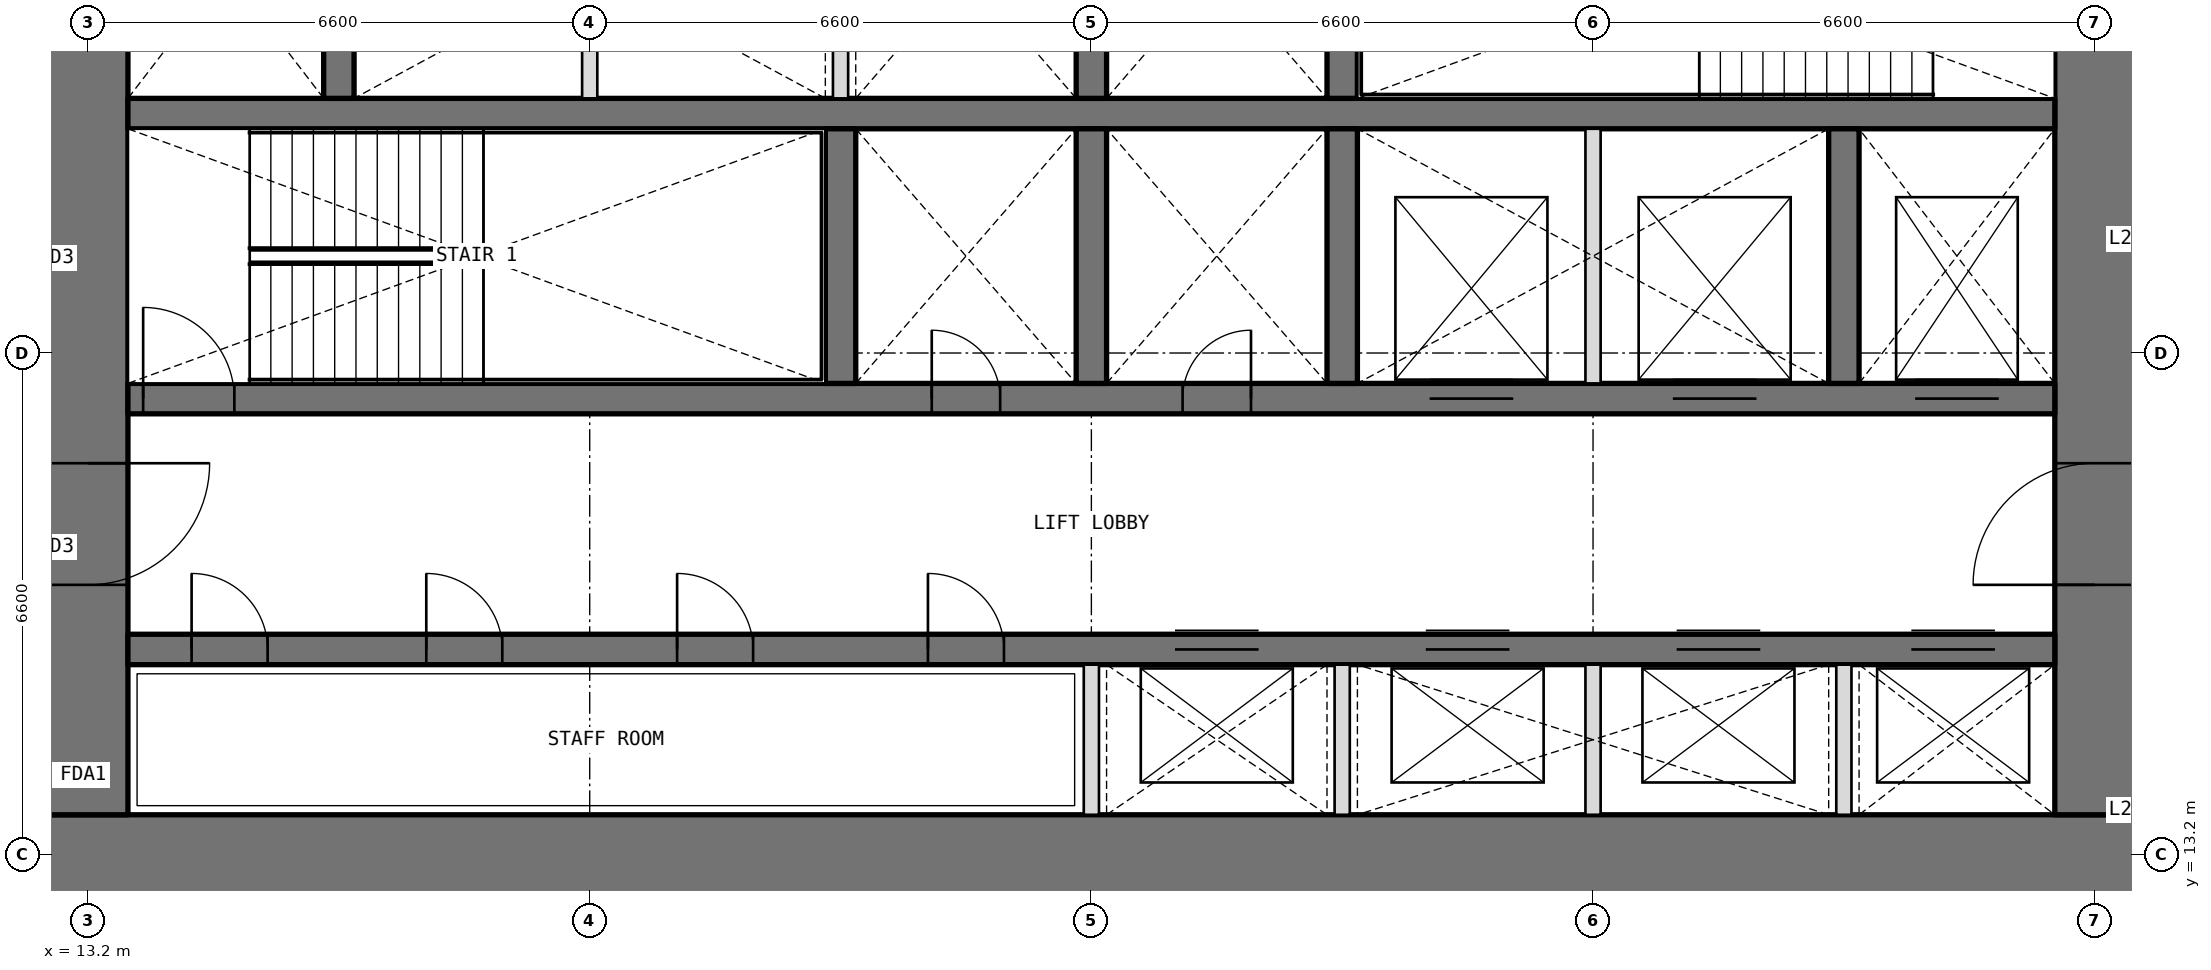
"""IFC4 building model, lengths in metres.
Left out: names, types, materials, properties, quantities, classifications, styles, units other than length and angle.
Written with IfcOpenShell. Run it as: python <this file> out.ifc"""

import sys

from ifc_helpers import new_model, si_unit, direction, frame, frame_2d, origin, place, context, subcontext, project, spatial, rectangle, extrude, element, fill, save


model = new_model("IFC4")
c1 = context("Model", 3, precision=1e-05, world=origin(), true_north=direction((0.0, 1.0)))
c2 = subcontext(c1, "Body", "Model", "MODEL_VIEW")
j1 = project(units=[si_unit("LENGTHUNIT", "METRE"), si_unit("PLANEANGLEUNIT", "RADIAN")], contexts=[c1])
p1 = place(None, origin())
s1 = spatial("IfcSite", under=j1, at=p1, CompositionType="ELEMENT")
p2 = place(p1, origin())
s2 = spatial("IfcBuilding", under=s1, at=p2, CompositionType="ELEMENT")
p3 = place(p2, frame((0.0, 0.0, 124.2)))
s3 = spatial("IfcBuildingStorey", under=s2, at=p3, CompositionType="ELEMENT", Elevation=124.2)
p4 = place(p3, frame((12.675, 13.2, 0.0), z_axis=(0.0, 0.0, 1.0), x_axis=(1.0, 0.0, 0.0)))
e1 = element("IfcWall", 1, at=p4, inside=s3, PredefinedType="SHEAR", context=c2, shape_type="SweptSolid", body=[
    extrude(rectangle(XDim=27.45, YDim=1.05, at=frame_2d((13.725, 0.0))), origin(), (0.0, 0.0, 1.0), 4.2),
])
p5 = place(p3, frame((39.6, 13.725, 0.0), z_axis=(0.0, 0.0, 1.0), x_axis=(0.0, 1.0, 0.0)))
e2 = element("IfcWall", 2, at=p5, inside=s3, PredefinedType="SHEAR", context=c2, shape_type="SweptSolid", body=[
    extrude(rectangle(XDim=18.75, YDim=1.05, at=frame_2d((9.375, 0.0))), origin(), (0.0, 0.0, 1.0), 4.2),
])
p6 = place(p5, frame((3.025, 0.0, 0.0)))
e3 = element("IfcOpeningElement", 3, at=p6, cuts=e2, PredefinedType="OPENING", context=c2, shape_type="SweptSolid", body=[
    extrude(rectangle(XDim=1.6, YDim=2.1, at=frame_2d((0.8, 1.05))), frame((0.0, 0.535, 0.0), z_axis=(0.0, -1.0, 0.0), x_axis=(1.0, 0.0, 0.0)), (0.0, 0.0, 1.0), 1.07),
])
p7 = place(p5, frame((13.825, 0.0, 0.0)))
e4 = element("IfcOpeningElement", 4, at=p7, cuts=e2, PredefinedType="OPENING", context=c2, shape_type="SweptSolid", body=[
    extrude(rectangle(XDim=1.6, YDim=2.1, at=frame_2d((0.8, 1.05))), frame((0.0, 0.535, 0.0), z_axis=(0.0, -1.0, 0.0), x_axis=(1.0, 0.0, 0.0)), (0.0, 0.0, 1.0), 1.07),
])
p8 = place(p3, frame((13.2, 32.475, 0.0), z_axis=(0.0, 0.0, 1.0), x_axis=(0.0, -1.0, 0.0)))
e5 = element("IfcWall", 5, at=p8, inside=s3, PredefinedType="SHEAR", context=c2, shape_type="SweptSolid", body=[
    extrude(rectangle(XDim=18.75, YDim=1.05, at=frame_2d((9.375, 0.0))), origin(), (0.0, 0.0, 1.0), 4.2),
])
p9 = place(p8, frame((14.125, 0.0, 0.0)))
e6 = element("IfcOpeningElement", 6, at=p9, cuts=e5, PredefinedType="OPENING", context=c2, shape_type="SweptSolid", body=[
    extrude(rectangle(XDim=1.6, YDim=2.1, at=frame_2d((0.8, 1.05))), frame((0.0, 0.535, 0.0), z_axis=(0.0, -1.0, 0.0), x_axis=(1.0, 0.0, 0.0)), (0.0, 0.0, 1.0), 1.07),
])
p10 = place(p8, frame((3.325, 0.0, 0.0)))
e7 = element("IfcOpeningElement", 7, at=p10, cuts=e5, PredefinedType="OPENING", context=c2, shape_type="SweptSolid", body=[
    extrude(rectangle(XDim=1.6, YDim=2.1, at=frame_2d((0.8, 1.05))), frame((0.0, 0.535, 0.0), z_axis=(0.0, -1.0, 0.0), x_axis=(1.0, 0.0, 0.0)), (0.0, 0.0, 1.0), 1.07),
])
p11 = place(p3, frame((13.725, 15.9, 0.0), z_axis=(0.0, 0.0, 1.0), x_axis=(1.0, 0.0, 0.0)))
e8 = element("IfcWall", 8, at=p11, inside=s3, PredefinedType="SHEAR", context=c2, shape_type="SweptSolid", body=[
    extrude(rectangle(XDim=25.35, YDim=0.4, at=frame_2d((12.675, 0.0))), origin(), (0.0, 0.0, 1.0), 4.2),
])
p12 = place(p11, frame((0.837, 0.0, 0.0)))
e9 = element("IfcOpeningElement", 9, at=p12, cuts=e8, PredefinedType="OPENING", context=c2, shape_type="SweptSolid", body=[
    extrude(rectangle(XDim=1.0, YDim=2.1, at=frame_2d((0.5, 1.05))), frame((0.0, 0.21, 0.0), z_axis=(0.0, -1.0, 0.0), x_axis=(1.0, 0.0, 0.0)), (0.0, 0.0, 1.0), 0.42),
])
p13 = place(p11, frame((3.925, 0.0, 0.0)))
e10 = element("IfcOpeningElement", 10, at=p13, cuts=e8, PredefinedType="OPENING", context=c2, shape_type="SweptSolid", body=[
    extrude(rectangle(XDim=1.0, YDim=2.1, at=frame_2d((0.5, 1.05))), frame((0.0, 0.21, 0.0), z_axis=(0.0, -1.0, 0.0), x_axis=(1.0, 0.0, 0.0)), (0.0, 0.0, 1.0), 0.42),
])
p14 = place(p11, frame((7.225, 0.0, 0.0)))
e11 = element("IfcOpeningElement", 11, at=p14, cuts=e8, PredefinedType="OPENING", context=c2, shape_type="SweptSolid", body=[
    extrude(rectangle(XDim=1.0, YDim=2.1, at=frame_2d((0.5, 1.05))), frame((0.0, 0.21, 0.0), z_axis=(0.0, -1.0, 0.0), x_axis=(1.0, 0.0, 0.0)), (0.0, 0.0, 1.0), 0.42),
])
p15 = place(p11, frame((10.525, 0.0, 0.0)))
e12 = element("IfcOpeningElement", 12, at=p15, cuts=e8, PredefinedType="OPENING", context=c2, shape_type="SweptSolid", body=[
    extrude(rectangle(XDim=1.0, YDim=2.1, at=frame_2d((0.5, 1.05))), frame((0.0, 0.21, 0.0), z_axis=(0.0, -1.0, 0.0), x_axis=(1.0, 0.0, 0.0)), (0.0, 0.0, 1.0), 0.42),
])
p16 = place(p11, frame((13.775, 0.0, 0.0)))
e13 = element("IfcOpeningElement", 13, at=p16, cuts=e8, PredefinedType="OPENING", context=c2, shape_type="SweptSolid", body=[
    extrude(rectangle(XDim=1.1, YDim=2.1, at=frame_2d((0.55, 1.05))), frame((0.0, 0.21, 0.0), z_axis=(0.0, -1.0, 0.0), x_axis=(1.0, 0.0, 0.0)), (0.0, 0.0, 1.0), 0.42),
])
p17 = place(p11, frame((17.075, 0.0, 0.0)))
e14 = element("IfcOpeningElement", 14, at=p17, cuts=e8, PredefinedType="OPENING", context=c2, shape_type="SweptSolid", body=[
    extrude(rectangle(XDim=1.1, YDim=2.1, at=frame_2d((0.55, 1.05))), frame((0.0, 0.21, 0.0), z_axis=(0.0, -1.0, 0.0), x_axis=(1.0, 0.0, 0.0)), (0.0, 0.0, 1.0), 0.42),
])
p18 = place(p11, frame((20.375, 0.0, 0.0)))
e15 = element("IfcOpeningElement", 15, at=p18, cuts=e8, PredefinedType="OPENING", context=c2, shape_type="SweptSolid", body=[
    extrude(rectangle(XDim=1.1, YDim=2.1, at=frame_2d((0.55, 1.05))), frame((0.0, 0.21, 0.0), z_axis=(0.0, -1.0, 0.0), x_axis=(1.0, 0.0, 0.0)), (0.0, 0.0, 1.0), 0.42),
])
p19 = place(p11, frame((23.462, 0.0, 0.0)))
e16 = element("IfcOpeningElement", 16, at=p19, cuts=e8, PredefinedType="OPENING", context=c2, shape_type="SweptSolid", body=[
    extrude(rectangle(XDim=1.1, YDim=2.1, at=frame_2d((0.55, 1.05))), frame((0.0, 0.21, 0.0), z_axis=(0.0, -1.0, 0.0), x_axis=(1.0, 0.0, 0.0)), (0.0, 0.0, 1.0), 0.42),
])
p20 = place(p3, frame((13.725, 19.2, 0.0), z_axis=(0.0, 0.0, 1.0), x_axis=(1.0, 0.0, 0.0)))
e17 = element("IfcWall", 17, at=p20, inside=s3, PredefinedType="SHEAR", context=c2, shape_type="SweptSolid", body=[
    extrude(rectangle(XDim=25.35, YDim=0.4, at=frame_2d((12.675, 0.0))), origin(), (0.0, 0.0, 1.0), 4.2),
])
p21 = place(p20, frame((10.575, 0.0, 0.0)))
e18 = element("IfcOpeningElement", 18, at=p21, cuts=e17, PredefinedType="OPENING", context=c2, shape_type="SweptSolid", body=[
    extrude(rectangle(XDim=0.9, YDim=2.1, at=frame_2d((0.45, 1.05))), frame((0.0, 0.21, 0.0), z_axis=(0.0, -1.0, 0.0), x_axis=(1.0, 0.0, 0.0)), (0.0, 0.0, 1.0), 0.42),
])
p22 = place(p20, frame((13.875, 0.0, 0.0)))
e19 = element("IfcOpeningElement", 19, at=p22, cuts=e17, PredefinedType="OPENING", context=c2, shape_type="SweptSolid", body=[
    extrude(rectangle(XDim=0.9, YDim=2.1, at=frame_2d((0.45, 1.05))), frame((0.0, 0.21, 0.0), z_axis=(0.0, -1.0, 0.0), x_axis=(1.0, 0.0, 0.0)), (0.0, 0.0, 1.0), 0.42),
])
p23 = place(p20, frame((0.2, 0.0, 0.0)))
e20 = element("IfcOpeningElement", 20, at=p23, cuts=e17, PredefinedType="OPENING", context=c2, shape_type="SweptSolid", body=[
    extrude(rectangle(XDim=1.2, YDim=2.1, at=frame_2d((0.6, 1.05))), frame((0.0, 0.21, 0.0), z_axis=(0.0, -1.0, 0.0), x_axis=(1.0, 0.0, 0.0)), (0.0, 0.0, 1.0), 0.42),
])
p24 = place(p20, frame((23.512, 0.0, 0.0)))
e21 = element("IfcOpeningElement", 21, at=p24, cuts=e17, PredefinedType="OPENING", context=c2, shape_type="SweptSolid", body=[
    extrude(rectangle(XDim=1.1, YDim=2.1, at=frame_2d((0.55, 1.05))), frame((0.0, 0.21, 0.0), z_axis=(0.0, -1.0, 0.0), x_axis=(1.0, 0.0, 0.0)), (0.0, 0.0, 1.0), 0.42),
])
p25 = place(p20, frame((17.125, 0.0, 0.0)))
e22 = element("IfcOpeningElement", 22, at=p25, cuts=e17, PredefinedType="OPENING", context=c2, shape_type="SweptSolid", body=[
    extrude(rectangle(XDim=1.1, YDim=2.1, at=frame_2d((0.55, 1.05))), frame((0.0, 0.21, 0.0), z_axis=(0.0, -1.0, 0.0), x_axis=(1.0, 0.0, 0.0)), (0.0, 0.0, 1.0), 0.42),
])
p26 = place(p20, frame((20.325, 0.0, 0.0)))
e23 = element("IfcOpeningElement", 23, at=p26, cuts=e17, PredefinedType="OPENING", context=c2, shape_type="SweptSolid", body=[
    extrude(rectangle(XDim=1.1, YDim=2.1, at=frame_2d((0.55, 1.05))), frame((0.0, 0.21, 0.0), z_axis=(0.0, -1.0, 0.0), x_axis=(1.0, 0.0, 0.0)), (0.0, 0.0, 1.0), 0.42),
])
p27 = place(p3, frame((13.725, 22.95, 0.0), z_axis=(0.0, 0.0, 1.0), x_axis=(1.0, 0.0, 0.0)))
e24 = element("IfcWall", 24, at=p27, inside=s3, PredefinedType="SHEAR", context=c2, shape_type="SweptSolid", body=[
    extrude(rectangle(XDim=25.35, YDim=0.4, at=frame_2d((12.675, 0.0))), origin(), (0.0, 0.0, 1.0), 4.2),
])
for number, where, z_axis, x_axis in (
    (25, (23.1, 19.4, 0.0), (0.0, 0.0, 1.0), (0.0, 1.0, 0.0)),
    (26, (26.4, 19.4, 0.0), (0.0, 0.0, 1.0), (0.0, 1.0, 0.0)),
    (27, (29.7, 19.4, 0.0), (0.0, 0.0, 1.0), (0.0, 1.0, 0.0)),
    (28, (36.3, 19.4, 0.0), (0.0, 0.0, 1.0), (0.0, 1.0, 0.0)),
    (29, (16.5, 23.15, 0.0), (0.0, 0.0, 1.0), (0.0, 1.0, 0.0)),
    (30, (26.4, 23.15, 0.0), (0.0, 0.0, 1.0), (0.0, 1.0, 0.0)),
    (31, (29.7, 23.15, 0.0), (0.0, 0.0, 1.0), (0.0, 1.0, 0.0)),
):
    element("IfcWall", number, at=place(p3, frame(where, z_axis=z_axis, x_axis=x_axis)), inside=s3, PredefinedType="SHEAR", context=c2, shape_type="SweptSolid", body=[
        extrude(rectangle(XDim=3.35, YDim=0.4, at=frame_2d((1.675, 0.0))), origin(), (0.0, 0.0, 1.0), 4.2),
    ])
for number, where, z_axis, x_axis in (
    (32, (26.4, 13.725, 0.0), (0.0, 0.0, 1.0), (0.0, 1.0, 0.0)),
    (33, (29.7, 13.725, 0.0), (0.0, 0.0, 1.0), (0.0, 1.0, 0.0)),
    (34, (33.0, 13.725, 0.0), (0.0, 0.0, 1.0), (0.0, 1.0, 0.0)),
    (35, (36.3, 13.725, 0.0), (0.0, 0.0, 1.0), (0.0, 1.0, 0.0)),
):
    element("IfcWall", number, at=place(p3, frame(where, z_axis=z_axis, x_axis=x_axis)), inside=s3, PredefinedType="PARTITIONING", context=c2, shape_type="SweptSolid", body=[
        extrude(rectangle(XDim=1.975, YDim=0.2, at=frame_2d((0.987, 0.0))), origin(), (0.0, 0.0, 1.0), 4.2),
    ])
for number, where, z_axis, x_axis in (
    (36, (33.0, 19.4, 0.0), (0.0, 0.0, 1.0), (0.0, 1.0, 0.0)),
    (37, (19.8, 23.15, 0.0), (0.0, 0.0, 1.0), (0.0, 1.0, 0.0)),
    (38, (23.1, 23.15, 0.0), (0.0, 0.0, 1.0), (0.0, 1.0, 0.0)),
):
    element("IfcWall", number, at=place(p3, frame(where, z_axis=z_axis, x_axis=x_axis)), inside=s3, PredefinedType="PARTITIONING", context=c2, shape_type="SweptSolid", body=[
        extrude(rectangle(XDim=3.35, YDim=0.2, at=frame_2d((1.675, 0.0))), origin(), (0.0, 0.0, 1.0), 4.2),
    ])
p28 = place(p21, origin())
e39 = element("IfcDoor", 39, at=p28, inside=s3, OperationType="SINGLE_SWING_LEFT", PredefinedType="DOOR", context=c2, shape_type="SweptSolid", body=[
    extrude(rectangle(XDim=0.9, YDim=2.1, at=frame_2d((0.45, 1.05))), frame((0.0, 0.025, 0.0), z_axis=(0.0, -1.0, 0.0), x_axis=(1.0, 0.0, 0.0)), (0.0, 0.0, 1.0), 0.05),
])
fill(e18, e39)
p29 = place(p22, origin())
e40 = element("IfcDoor", 40, at=p29, inside=s3, OperationType="SINGLE_SWING_RIGHT", PredefinedType="DOOR", context=c2, shape_type="SweptSolid", body=[
    extrude(rectangle(XDim=0.9, YDim=2.1, at=frame_2d((0.45, 1.05))), frame((0.0, 0.025, 0.0), z_axis=(0.0, -1.0, 0.0), x_axis=(1.0, 0.0, 0.0)), (0.0, 0.0, 1.0), 0.05),
])
fill(e19, e40)
p30 = place(p12, origin())
e41 = element("IfcDoor", 41, at=p30, inside=s3, OperationType="SINGLE_SWING_LEFT", PredefinedType="DOOR", context=c2, shape_type="SweptSolid", body=[
    extrude(rectangle(XDim=1.0, YDim=2.1, at=frame_2d((0.5, 1.05))), frame((0.0, 0.025, 0.0), z_axis=(0.0, -1.0, 0.0), x_axis=(1.0, 0.0, 0.0)), (0.0, 0.0, 1.0), 0.05),
])
fill(e9, e41)
p31 = place(p13, origin())
e42 = element("IfcDoor", 42, at=p31, inside=s3, OperationType="SINGLE_SWING_LEFT", PredefinedType="DOOR", context=c2, shape_type="SweptSolid", body=[
    extrude(rectangle(XDim=1.0, YDim=2.1, at=frame_2d((0.5, 1.05))), frame((0.0, 0.025, 0.0), z_axis=(0.0, -1.0, 0.0), x_axis=(1.0, 0.0, 0.0)), (0.0, 0.0, 1.0), 0.05),
])
fill(e10, e42)
p32 = place(p14, origin())
e43 = element("IfcDoor", 43, at=p32, inside=s3, OperationType="SINGLE_SWING_LEFT", PredefinedType="DOOR", context=c2, shape_type="SweptSolid", body=[
    extrude(rectangle(XDim=1.0, YDim=2.1, at=frame_2d((0.5, 1.05))), frame((0.0, 0.025, 0.0), z_axis=(0.0, -1.0, 0.0), x_axis=(1.0, 0.0, 0.0)), (0.0, 0.0, 1.0), 0.05),
])
fill(e11, e43)
p33 = place(p15, origin())
e44 = element("IfcDoor", 44, at=p33, inside=s3, OperationType="SINGLE_SWING_LEFT", PredefinedType="DOOR", context=c2, shape_type="SweptSolid", body=[
    extrude(rectangle(XDim=1.0, YDim=2.1, at=frame_2d((0.5, 1.05))), frame((0.0, 0.025, 0.0), z_axis=(0.0, -1.0, 0.0), x_axis=(1.0, 0.0, 0.0)), (0.0, 0.0, 1.0), 0.05),
])
fill(e12, e44)
p34 = place(p23, origin())
e45 = element("IfcDoor", 45, at=p34, inside=s3, OperationType="SINGLE_SWING_LEFT", PredefinedType="DOOR", context=c2, shape_type="SweptSolid", body=[
    extrude(rectangle(XDim=1.2, YDim=2.1, at=frame_2d((0.6, 1.05))), frame((0.0, 0.025, 0.0), z_axis=(0.0, -1.0, 0.0), x_axis=(1.0, 0.0, 0.0)), (0.0, 0.0, 1.0), 0.05),
])
fill(e20, e45)
p35 = place(p9, origin())
e46 = element("IfcDoor", 46, at=p35, inside=s3, OperationType="DOUBLE_DOOR_DOUBLE_SWING", PredefinedType="DOOR", context=c2, shape_type="SweptSolid", body=[
    extrude(rectangle(XDim=1.6, YDim=2.1, at=frame_2d((0.8, 1.05))), frame((0.0, 0.025, 0.0), z_axis=(0.0, -1.0, 0.0), x_axis=(1.0, 0.0, 0.0)), (0.0, 0.0, 1.0), 0.05),
])
fill(e6, e46)
p36 = place(p6, origin())
e47 = element("IfcDoor", 47, at=p36, inside=s3, OperationType="DOUBLE_DOOR_DOUBLE_SWING", PredefinedType="DOOR", context=c2, shape_type="SweptSolid", body=[
    extrude(rectangle(XDim=1.6, YDim=2.1, at=frame_2d((0.8, 1.05))), frame((0.0, 0.025, 0.0), z_axis=(0.0, -1.0, 0.0), x_axis=(1.0, 0.0, 0.0)), (0.0, 0.0, 1.0), 0.05),
])
fill(e3, e47)
p37 = place(p16, origin())
e48 = element("IfcDoor", 48, at=p37, inside=s3, OperationType="DOUBLE_DOOR_SLIDING", PredefinedType="DOOR", context=c2, shape_type="SweptSolid", body=[
    extrude(rectangle(XDim=1.1, YDim=2.1, at=frame_2d((0.55, 1.05))), frame((0.0, 0.025, 0.0), z_axis=(0.0, -1.0, 0.0), x_axis=(1.0, 0.0, 0.0)), (0.0, 0.0, 1.0), 0.05),
])
fill(e13, e48)
p38 = place(p17, origin())
e49 = element("IfcDoor", 49, at=p38, inside=s3, OperationType="DOUBLE_DOOR_SLIDING", PredefinedType="DOOR", context=c2, shape_type="SweptSolid", body=[
    extrude(rectangle(XDim=1.1, YDim=2.1, at=frame_2d((0.55, 1.05))), frame((0.0, 0.025, 0.0), z_axis=(0.0, -1.0, 0.0), x_axis=(1.0, 0.0, 0.0)), (0.0, 0.0, 1.0), 0.05),
])
fill(e14, e49)
p39 = place(p18, origin())
e50 = element("IfcDoor", 50, at=p39, inside=s3, OperationType="DOUBLE_DOOR_SLIDING", PredefinedType="DOOR", context=c2, shape_type="SweptSolid", body=[
    extrude(rectangle(XDim=1.1, YDim=2.1, at=frame_2d((0.55, 1.05))), frame((0.0, 0.025, 0.0), z_axis=(0.0, -1.0, 0.0), x_axis=(1.0, 0.0, 0.0)), (0.0, 0.0, 1.0), 0.05),
])
fill(e15, e50)
p40 = place(p19, origin())
e51 = element("IfcDoor", 51, at=p40, inside=s3, OperationType="DOUBLE_DOOR_SLIDING", PredefinedType="DOOR", context=c2, shape_type="SweptSolid", body=[
    extrude(rectangle(XDim=1.1, YDim=2.1, at=frame_2d((0.55, 1.05))), frame((0.0, 0.025, 0.0), z_axis=(0.0, -1.0, 0.0), x_axis=(1.0, 0.0, 0.0)), (0.0, 0.0, 1.0), 0.05),
])
fill(e16, e51)
p41 = place(p24, origin())
e52 = element("IfcDoor", 52, at=p41, inside=s3, OperationType="DOUBLE_DOOR_SLIDING", PredefinedType="DOOR", context=c2, shape_type="SweptSolid", body=[
    extrude(rectangle(XDim=1.1, YDim=2.1, at=frame_2d((0.55, 1.05))), frame((0.0, 0.025, 0.0), z_axis=(0.0, -1.0, 0.0), x_axis=(1.0, 0.0, 0.0)), (0.0, 0.0, 1.0), 0.05),
])
fill(e21, e52)
p42 = place(p25, origin())
e53 = element("IfcDoor", 53, at=p42, inside=s3, OperationType="DOUBLE_DOOR_SLIDING", PredefinedType="DOOR", context=c2, shape_type="SweptSolid", body=[
    extrude(rectangle(XDim=1.1, YDim=2.1, at=frame_2d((0.55, 1.05))), frame((0.0, 0.025, 0.0), z_axis=(0.0, -1.0, 0.0), x_axis=(1.0, 0.0, 0.0)), (0.0, 0.0, 1.0), 0.05),
])
fill(e22, e53)
p43 = place(p26, origin())
e54 = element("IfcDoor", 54, at=p43, inside=s3, OperationType="DOUBLE_DOOR_SLIDING", PredefinedType="DOOR", context=c2, shape_type="SweptSolid", body=[
    extrude(rectangle(XDim=1.1, YDim=2.1, at=frame_2d((0.55, 1.05))), frame((0.0, 0.025, 0.0), z_axis=(0.0, -1.0, 0.0), x_axis=(1.0, 0.0, 0.0)), (0.0, 0.0, 1.0), 0.05),
])
fill(e23, e54)
save(model, sys.argv[1])
